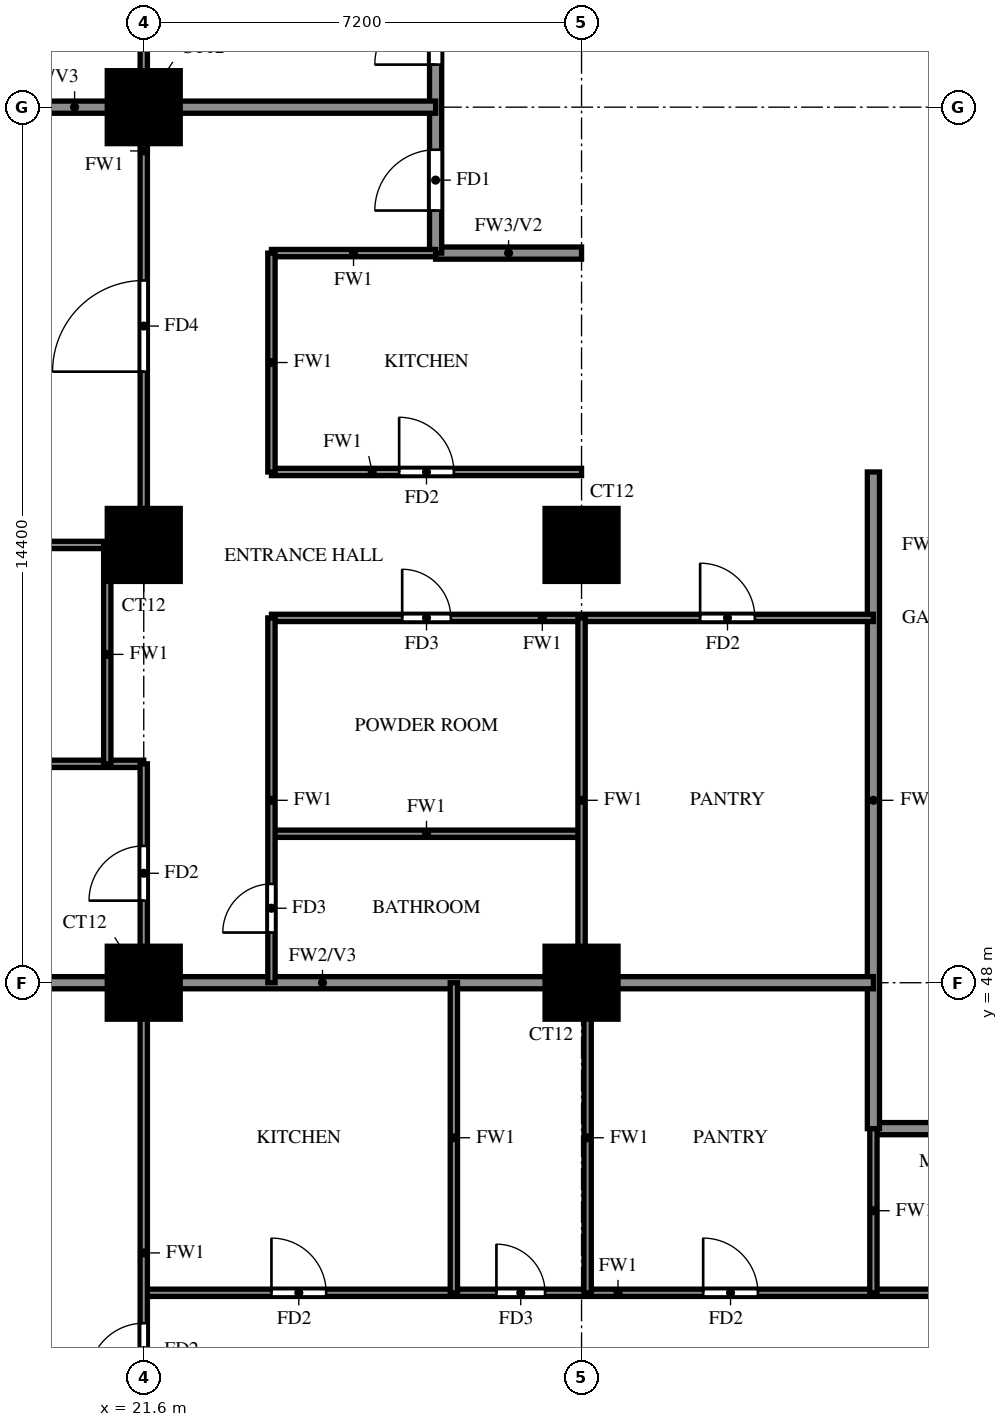
"""IFC4 building model, lengths in metres.
Left out: names, types, materials, properties, quantities, classifications, styles, units other than length and angle.
Written with IfcOpenShell. Run it as: python <this file> out.ifc"""

import sys

from ifc_helpers import new_model, si_unit, direction, frame, frame_2d, origin, origin_2d, place, context, subcontext, project, spatial, rectangle, extrude, source, transform, mapped, element, fill, save


model = new_model("IFC4")
c1 = context("Model", 3, precision=1e-05, world=origin(), true_north=direction((0.0, 1.0)))
c2 = subcontext(c1, "Body", "Model", "MODEL_VIEW")
j1 = project(units=[si_unit("LENGTHUNIT", "METRE"), si_unit("PLANEANGLEUNIT", "RADIAN")], contexts=[c1])
p1 = place(None, origin())
s1 = spatial("IfcSite", under=j1, at=p1, CompositionType="ELEMENT")
p2 = place(p1, origin())
s2 = spatial("IfcBuilding", under=s1, at=p2, CompositionType="ELEMENT")
p3 = place(p2, frame((0.0, 0.0, 100.5)))
s3 = spatial("IfcBuildingStorey", under=s2, at=p3, CompositionType="ELEMENT", Elevation=100.5)
m1 = source(origin(), c2, "Body", "SweptSolid", [
    extrude(rectangle(XDim=1.2, YDim=1.2, at=origin_2d()), origin(), (0.0, 0.0, 1.0), 3.18),
])
for number, where, z_axis, x_axis in (
    (1, (21.6, 48.0, 0.0), (0.0, 0.0, 1.0), (1.0, 0.0, 0.0)),
    (2, (28.8, 48.0, 0.0), (0.0, 0.0, 1.0), (1.0, 0.0, 0.0)),
    (3, (21.6, 55.2, 0.0), (0.0, 0.0, 1.0), (1.0, 0.0, 0.0)),
    (4, (28.8, 55.2, 0.0), (0.0, 0.0, 1.0), (1.0, 0.0, 0.0)),
    (5, (21.6, 62.4, 0.0), (0.0, 0.0, 1.0), (1.0, 0.0, 0.0)),
):
    element("IfcColumn", number, at=place(p3, frame(where, z_axis=z_axis, x_axis=x_axis)), inside=s3, PredefinedType="COLUMN", context=c2, shape_type="MappedRepresentation", body=[
        mapped(m1, transform((0.0, 0.0, 0.0))),
    ])
p4 = place(p3, frame((33.6, 45.6, 0.0), z_axis=(0.0, 0.0, 1.0), x_axis=(1.0, 0.0, 0.0)))
e6 = element("IfcWall", 6, at=p4, inside=s3, PredefinedType="SOLIDWALL", context=c2, shape_type="SweptSolid", body=[
    extrude(rectangle(XDim=6.0, YDim=0.2, at=frame_2d((3.0, 0.0))), origin(), (0.0, 0.0, 1.0), 3.18),
])
p5 = place(p4, frame((4.3, 0.0, 0.0)))
e7 = element("IfcOpeningElement", 7, at=p5, cuts=e6, PredefinedType="OPENING", context=c2, shape_type="SweptSolid", body=[
    extrude(rectangle(XDim=1.0, YDim=2.1, at=frame_2d((0.5, 1.05))), frame((0.0, 0.11, 0.0), z_axis=(0.0, -1.0, 0.0), x_axis=(1.0, 0.0, 0.0)), (0.0, 0.0, 1.0), 0.22),
])
p6 = place(p3, frame((26.4, 60.0, 0.0), z_axis=(0.0, 0.0, 1.0), x_axis=(1.0, 0.0, 0.0)))
e8 = element("IfcWall", 8, at=p6, inside=s3, PredefinedType="SOLIDWALL", context=c2, shape_type="SweptSolid", body=[
    extrude(rectangle(XDim=2.4, YDim=0.2, at=frame_2d((1.2, 0.0))), origin(), (0.0, 0.0, 1.0), 3.18),
])
p7 = place(p3, frame((26.4, 60.0, 0.0), z_axis=(0.0, 0.0, 1.0), x_axis=(0.0, 1.0, 0.0)))
e9 = element("IfcWall", 9, at=p7, inside=s3, PredefinedType="SOLIDWALL", context=c2, shape_type="SweptSolid", body=[
    extrude(rectangle(XDim=9.6, YDim=0.2, at=frame_2d((4.8, 0.0))), origin(), (0.0, 0.0, 1.0), 3.18),
])
p8 = place(p7, frame((0.7, 0.0, 0.0)))
e10 = element("IfcOpeningElement", 10, at=p8, cuts=e9, PredefinedType="OPENING", context=c2, shape_type="SweptSolid", body=[
    extrude(rectangle(XDim=1.0, YDim=2.1, at=frame_2d((0.5, 1.05))), frame((0.0, 0.11, 0.0), z_axis=(0.0, -1.0, 0.0), x_axis=(1.0, 0.0, 0.0)), (0.0, 0.0, 1.0), 0.22),
])
p9 = place(p7, frame((3.1, 0.0, 0.0)))
e11 = element("IfcOpeningElement", 11, at=p9, cuts=e9, PredefinedType="OPENING", context=c2, shape_type="SweptSolid", body=[
    extrude(rectangle(XDim=1.0, YDim=2.1, at=frame_2d((0.5, 1.05))), frame((0.0, 0.11, 0.0), z_axis=(0.0, -1.0, 0.0), x_axis=(1.0, 0.0, 0.0)), (0.0, 0.0, 1.0), 0.22),
])
p10 = place(p3, frame((33.6, 45.6, 0.0), z_axis=(0.0, 0.0, 1.0), x_axis=(0.0, 1.0, 0.0)))
e12 = element("IfcWall", 12, at=p10, inside=s3, PredefinedType="SOLIDWALL", context=c2, shape_type="SweptSolid", body=[
    extrude(rectangle(XDim=10.8, YDim=0.2, at=frame_2d((5.4, 0.0))), origin(), (0.0, 0.0, 1.0), 3.18),
])
p11 = place(p3, frame((14.525, 48.0, 0.0), z_axis=(0.0, 0.0, 1.0), x_axis=(1.0, 0.0, 0.0)))
e13 = element("IfcWall", 13, at=p11, inside=s3, PredefinedType="SOLIDWALL", context=c2, shape_type="SweptSolid", body=[
    extrude(rectangle(XDim=19.075, YDim=0.2, at=frame_2d((9.538, 0.0))), origin(), (0.0, 0.0, 1.0), 3.18),
])
p12 = place(p3, frame((14.525, 62.4, 0.0), z_axis=(0.0, 0.0, 1.0), x_axis=(1.0, 0.0, 0.0)))
e14 = element("IfcWall", 14, at=p12, inside=s3, PredefinedType="SOLIDWALL", context=c2, shape_type="SweptSolid", body=[
    extrude(rectangle(XDim=11.875, YDim=0.2, at=frame_2d((5.938, 0.0))), origin(), (0.0, 0.0, 1.0), 3.18),
])
p13 = place(p3, frame((21.6, 42.9, 0.0), z_axis=(0.0, 0.0, 1.0), x_axis=(1.0, 0.0, 0.0)))
e15 = element("IfcWall", 15, at=p13, inside=s3, PredefinedType="PARTITIONING", context=c2, shape_type="SweptSolid", body=[
    extrude(rectangle(XDim=15.6, YDim=0.12, at=frame_2d((7.8, 0.0))), origin(), (0.0, 0.0, 1.0), 3.18),
])
p14 = place(p13, frame((2.1, 0.0, 0.0)))
e16 = element("IfcOpeningElement", 16, at=p14, cuts=e15, PredefinedType="OPENING", context=c2, shape_type="SweptSolid", body=[
    extrude(rectangle(XDim=0.9, YDim=2.1, at=frame_2d((0.45, 1.05))), frame((0.0, 0.07, 0.0), z_axis=(0.0, -1.0, 0.0), x_axis=(1.0, 0.0, 0.0)), (0.0, 0.0, 1.0), 0.14),
])
p15 = place(p13, frame((5.8, 0.0, 0.0)))
e17 = element("IfcOpeningElement", 17, at=p15, cuts=e15, PredefinedType="OPENING", context=c2, shape_type="SweptSolid", body=[
    extrude(rectangle(XDim=0.8, YDim=2.1, at=frame_2d((0.4, 1.05))), frame((0.0, 0.07, 0.0), z_axis=(0.0, -1.0, 0.0), x_axis=(1.0, 0.0, 0.0)), (0.0, 0.0, 1.0), 0.14),
])
p16 = place(p13, frame((9.2, 0.0, 0.0)))
e18 = element("IfcOpeningElement", 18, at=p16, cuts=e15, PredefinedType="OPENING", context=c2, shape_type="SweptSolid", body=[
    extrude(rectangle(XDim=0.9, YDim=2.1, at=frame_2d((0.45, 1.05))), frame((0.0, 0.07, 0.0), z_axis=(0.0, -1.0, 0.0), x_axis=(1.0, 0.0, 0.0)), (0.0, 0.0, 1.0), 0.14),
])
p17 = place(p13, frame((13.35, 0.0, 0.0)))
e19 = element("IfcOpeningElement", 19, at=p17, cuts=e15, PredefinedType="OPENING", context=c2, shape_type="SweptSolid", body=[
    extrude(rectangle(XDim=0.9, YDim=2.1, at=frame_2d((0.45, 1.05))), frame((0.0, 0.07, 0.0), z_axis=(0.0, -1.0, 0.0), x_axis=(1.0, 0.0, 0.0)), (0.0, 0.0, 1.0), 0.14),
])
p18 = place(p3, frame((23.7, 50.45, 0.0), z_axis=(0.0, 0.0, 1.0), x_axis=(1.0, 0.0, 0.0)))
e20 = element("IfcWall", 20, at=p18, inside=s3, PredefinedType="PARTITIONING", context=c2, shape_type="SweptSolid", body=[
    extrude(rectangle(XDim=5.1, YDim=0.12, at=frame_2d((2.55, 0.0))), origin(), (0.0, 0.0, 1.0), 3.18),
])
p19 = place(p3, frame((14.525, 51.6, 0.0), z_axis=(0.0, 0.0, 1.0), x_axis=(1.0, 0.0, 0.0)))
e21 = element("IfcWall", 21, at=p19, inside=s3, PredefinedType="PARTITIONING", context=c2, shape_type="SweptSolid", body=[
    extrude(rectangle(XDim=7.075, YDim=0.12, at=frame_2d((3.538, 0.0))), origin(), (0.0, 0.0, 1.0), 2.28),
])
p20 = place(p19, frame((2.837, 0.0, 0.0)))
e22 = element("IfcOpeningElement", 22, at=p20, cuts=e21, PredefinedType="OPENING", context=c2, shape_type="SweptSolid", body=[
    extrude(rectangle(XDim=0.8, YDim=2.1, at=frame_2d((0.4, 1.05))), frame((0.0, 0.07, 0.0), z_axis=(0.0, -1.0, 0.0), x_axis=(1.0, 0.0, 0.0)), (0.0, 0.0, 1.0), 0.14),
])
p21 = place(p3, frame((23.7, 54.0, 0.0), z_axis=(0.0, 0.0, 1.0), x_axis=(1.0, 0.0, 0.0)))
e23 = element("IfcWall", 23, at=p21, inside=s3, PredefinedType="PARTITIONING", context=c2, shape_type="SweptSolid", body=[
    extrude(rectangle(XDim=9.9, YDim=0.12, at=frame_2d((4.95, 0.0))), origin(), (0.0, 0.0, 1.0), 3.18),
])
p22 = place(p21, frame((2.15, 0.0, 0.0)))
e24 = element("IfcOpeningElement", 24, at=p22, cuts=e23, PredefinedType="OPENING", context=c2, shape_type="SweptSolid", body=[
    extrude(rectangle(XDim=0.8, YDim=2.1, at=frame_2d((0.4, 1.05))), frame((0.0, 0.07, 0.0), z_axis=(0.0, -1.0, 0.0), x_axis=(1.0, 0.0, 0.0)), (0.0, 0.0, 1.0), 0.14),
])
p23 = place(p21, frame((7.05, 0.0, 0.0)))
e25 = element("IfcOpeningElement", 25, at=p23, cuts=e23, PredefinedType="OPENING", context=c2, shape_type="SweptSolid", body=[
    extrude(rectangle(XDim=0.9, YDim=2.1, at=frame_2d((0.45, 1.05))), frame((0.0, 0.07, 0.0), z_axis=(0.0, -1.0, 0.0), x_axis=(1.0, 0.0, 0.0)), (0.0, 0.0, 1.0), 0.14),
])
p24 = place(p3, frame((14.525, 55.2, 0.0), z_axis=(0.0, 0.0, 1.0), x_axis=(1.0, 0.0, 0.0)))
e26 = element("IfcWall", 26, at=p24, inside=s3, PredefinedType="PARTITIONING", context=c2, shape_type="SweptSolid", body=[
    extrude(rectangle(XDim=7.075, YDim=0.12, at=frame_2d((3.538, 0.0))), origin(), (0.0, 0.0, 1.0), 3.18),
])
p25 = place(p3, frame((23.7, 56.4, 0.0), z_axis=(0.0, 0.0, 1.0), x_axis=(1.0, 0.0, 0.0)))
e27 = element("IfcWall", 27, at=p25, inside=s3, PredefinedType="PARTITIONING", context=c2, shape_type="SweptSolid", body=[
    extrude(rectangle(XDim=5.1, YDim=0.12, at=frame_2d((2.55, 0.0))), origin(), (0.0, 0.0, 1.0), 3.18),
])
p26 = place(p25, frame((2.1, 0.0, 0.0)))
e28 = element("IfcOpeningElement", 28, at=p26, cuts=e27, PredefinedType="OPENING", context=c2, shape_type="SweptSolid", body=[
    extrude(rectangle(XDim=0.9, YDim=2.1, at=frame_2d((0.45, 1.05))), frame((0.0, 0.07, 0.0), z_axis=(0.0, -1.0, 0.0), x_axis=(1.0, 0.0, 0.0)), (0.0, 0.0, 1.0), 0.14),
])
p27 = place(p3, frame((23.7, 60.0, 0.0), z_axis=(0.0, 0.0, 1.0), x_axis=(1.0, 0.0, 0.0)))
e29 = element("IfcWall", 29, at=p27, inside=s3, PredefinedType="PARTITIONING", context=c2, shape_type="SweptSolid", body=[
    extrude(rectangle(XDim=2.7, YDim=0.12, at=frame_2d((1.35, 0.0))), origin(), (0.0, 0.0, 1.0), 3.18),
])
p28 = place(p3, frame((21.0, 51.6, 0.0), z_axis=(0.0, 0.0, 1.0), x_axis=(0.0, 1.0, 0.0)))
e30 = element("IfcWall", 30, at=p28, inside=s3, PredefinedType="PARTITIONING", context=c2, shape_type="SweptSolid", body=[
    extrude(rectangle(XDim=3.6, YDim=0.12, at=frame_2d((1.8, 0.0))), origin(), (0.0, 0.0, 1.0), 3.18),
])
p29 = place(p3, frame((21.6, 33.725, 0.0), z_axis=(0.0, 0.0, 1.0), x_axis=(0.0, 1.0, 0.0)))
e31 = element("IfcWall", 31, at=p29, inside=s3, PredefinedType="PARTITIONING", context=c2, shape_type="SweptSolid", body=[
    extrude(rectangle(XDim=17.875, YDim=0.12, at=frame_2d((8.938, 0.0))), origin(), (0.0, 0.0, 1.0), 3.18),
])
p30 = place(p29, frame((7.775, 0.0, 0.0)))
e32 = element("IfcOpeningElement", 32, at=p30, cuts=e31, PredefinedType="OPENING", context=c2, shape_type="SweptSolid", body=[
    extrude(rectangle(XDim=0.9, YDim=2.1, at=frame_2d((0.45, 1.05))), frame((0.0, 0.07, 0.0), z_axis=(0.0, -1.0, 0.0), x_axis=(1.0, 0.0, 0.0)), (0.0, 0.0, 1.0), 0.14),
])
p31 = place(p29, frame((15.625, 0.0, 0.0)))
e33 = element("IfcOpeningElement", 33, at=p31, cuts=e31, PredefinedType="OPENING", context=c2, shape_type="SweptSolid", body=[
    extrude(rectangle(XDim=0.9, YDim=2.1, at=frame_2d((0.45, 1.05))), frame((0.0, 0.07, 0.0), z_axis=(0.0, -1.0, 0.0), x_axis=(1.0, 0.0, 0.0)), (0.0, 0.0, 1.0), 0.14),
])
p32 = place(p3, frame((21.6, 55.2, 0.0), z_axis=(0.0, 0.0, 1.0), x_axis=(0.0, 1.0, 0.0)))
e34 = element("IfcWall", 34, at=p32, inside=s3, PredefinedType="PARTITIONING", context=c2, shape_type="SweptSolid", body=[
    extrude(rectangle(XDim=14.4, YDim=0.12, at=frame_2d((7.2, 0.0))), origin(), (0.0, 0.0, 1.0), 3.18),
])
p33 = place(p32, frame((2.85, 0.0, 0.0)))
e35 = element("IfcOpeningElement", 35, at=p33, cuts=e34, PredefinedType="OPENING", context=c2, shape_type="SweptSolid", body=[
    extrude(rectangle(XDim=1.5, YDim=2.1, at=frame_2d((0.75, 1.05))), frame((0.0, 0.07, 0.0), z_axis=(0.0, -1.0, 0.0), x_axis=(1.0, 0.0, 0.0)), (0.0, 0.0, 1.0), 0.14),
])
p34 = place(p32, frame((8.55, 0.0, 0.0)))
e36 = element("IfcOpeningElement", 36, at=p34, cuts=e34, PredefinedType="OPENING", context=c2, shape_type="SweptSolid", body=[
    extrude(rectangle(XDim=0.9, YDim=2.1, at=frame_2d((0.45, 1.05))), frame((0.0, 0.07, 0.0), z_axis=(0.0, -1.0, 0.0), x_axis=(1.0, 0.0, 0.0)), (0.0, 0.0, 1.0), 0.14),
])
p35 = place(p32, frame((12.15, 0.0, 0.0)))
e37 = element("IfcOpeningElement", 37, at=p35, cuts=e34, PredefinedType="OPENING", context=c2, shape_type="SweptSolid", body=[
    extrude(rectangle(XDim=0.9, YDim=2.1, at=frame_2d((0.45, 1.05))), frame((0.0, 0.07, 0.0), z_axis=(0.0, -1.0, 0.0), x_axis=(1.0, 0.0, 0.0)), (0.0, 0.0, 1.0), 0.14),
])
p36 = place(p3, frame((23.7, 48.0, 0.0), z_axis=(0.0, 0.0, 1.0), x_axis=(0.0, 1.0, 0.0)))
e38 = element("IfcWall", 38, at=p36, inside=s3, PredefinedType="PARTITIONING", context=c2, shape_type="SweptSolid", body=[
    extrude(rectangle(XDim=6.0, YDim=0.12, at=frame_2d((3.0, 0.0))), origin(), (0.0, 0.0, 1.0), 3.18),
])
p37 = place(p36, frame((0.825, 0.0, 0.0)))
e39 = element("IfcOpeningElement", 39, at=p37, cuts=e38, PredefinedType="OPENING", context=c2, shape_type="SweptSolid", body=[
    extrude(rectangle(XDim=0.8, YDim=2.1, at=frame_2d((0.4, 1.05))), frame((0.0, 0.07, 0.0), z_axis=(0.0, -1.0, 0.0), x_axis=(1.0, 0.0, 0.0)), (0.0, 0.0, 1.0), 0.14),
])
p38 = place(p3, frame((23.7, 56.4, 0.0), z_axis=(0.0, 0.0, 1.0), x_axis=(0.0, 1.0, 0.0)))
e40 = element("IfcWall", 40, at=p38, inside=s3, PredefinedType="PARTITIONING", context=c2, shape_type="SweptSolid", body=[
    extrude(rectangle(XDim=3.6, YDim=0.12, at=frame_2d((1.8, 0.0))), origin(), (0.0, 0.0, 1.0), 3.18),
])
p39 = place(p3, frame((26.7, 42.9, 0.0), z_axis=(0.0, 0.0, 1.0), x_axis=(0.0, 1.0, 0.0)))
e41 = element("IfcWall", 41, at=p39, inside=s3, PredefinedType="PARTITIONING", context=c2, shape_type="SweptSolid", body=[
    extrude(rectangle(XDim=5.1, YDim=0.12, at=frame_2d((2.55, 0.0))), origin(), (0.0, 0.0, 1.0), 3.18),
])
p40 = place(p3, frame((28.8, 48.0, 0.0), z_axis=(0.0, 0.0, 1.0), x_axis=(0.0, 1.0, 0.0)))
e42 = element("IfcWall", 42, at=p40, inside=s3, PredefinedType="PARTITIONING", context=c2, shape_type="SweptSolid", body=[
    extrude(rectangle(XDim=6.0, YDim=0.12, at=frame_2d((3.0, 0.0))), origin(), (0.0, 0.0, 1.0), 3.18),
])
p41 = place(p3, frame((28.9, 42.9, 0.0), z_axis=(0.0, 0.0, 1.0), x_axis=(0.0, 1.0, 0.0)))
e43 = element("IfcWall", 43, at=p41, inside=s3, PredefinedType="PARTITIONING", context=c2, shape_type="SweptSolid", body=[
    extrude(rectangle(XDim=5.1, YDim=0.12, at=frame_2d((2.55, 0.0))), origin(), (0.0, 0.0, 1.0), 3.18),
])
p42 = place(p3, frame((33.6, 42.9, 0.0), z_axis=(0.0, 0.0, 1.0), x_axis=(0.0, 1.0, 0.0)))
e44 = element("IfcWall", 44, at=p42, inside=s3, PredefinedType="PARTITIONING", context=c2, shape_type="SweptSolid", body=[
    extrude(rectangle(XDim=2.7, YDim=0.12, at=frame_2d((1.35, 0.0))), origin(), (0.0, 0.0, 1.0), 3.18),
])
p43 = place(p30, origin())
e45 = element("IfcDoor", 45, at=p43, inside=s3, OperationType="SINGLE_SWING_LEFT", PredefinedType="DOOR", context=c2, shape_type="SweptSolid", body=[
    extrude(rectangle(XDim=0.9, YDim=2.1, at=frame_2d((0.45, 1.05))), frame((0.0, 0.025, 0.0), z_axis=(0.0, -1.0, 0.0), x_axis=(1.0, 0.0, 0.0)), (0.0, 0.0, 1.0), 0.05),
])
fill(e32, e45)
p44 = place(p14, origin())
e46 = element("IfcDoor", 46, at=p44, inside=s3, OperationType="SINGLE_SWING_RIGHT", PredefinedType="DOOR", context=c2, shape_type="SweptSolid", body=[
    extrude(rectangle(XDim=0.9, YDim=2.1, at=frame_2d((0.45, 1.05))), frame((0.0, 0.025, 0.0), z_axis=(0.0, -1.0, 0.0), x_axis=(1.0, 0.0, 0.0)), (0.0, 0.0, 1.0), 0.05),
])
fill(e16, e46)
p45 = place(p15, origin())
e47 = element("IfcDoor", 47, at=p45, inside=s3, OperationType="SINGLE_SWING_LEFT", PredefinedType="DOOR", context=c2, shape_type="SweptSolid", body=[
    extrude(rectangle(XDim=0.8, YDim=2.1, at=frame_2d((0.4, 1.05))), frame((0.0, 0.025, 0.0), z_axis=(0.0, -1.0, 0.0), x_axis=(1.0, 0.0, 0.0)), (0.0, 0.0, 1.0), 0.05),
])
fill(e17, e47)
p46 = place(p16, origin())
e48 = element("IfcDoor", 48, at=p46, inside=s3, OperationType="SINGLE_SWING_LEFT", PredefinedType="DOOR", context=c2, shape_type="SweptSolid", body=[
    extrude(rectangle(XDim=0.9, YDim=2.1, at=frame_2d((0.45, 1.05))), frame((0.0, 0.025, 0.0), z_axis=(0.0, -1.0, 0.0), x_axis=(1.0, 0.0, 0.0)), (0.0, 0.0, 1.0), 0.05),
])
fill(e18, e48)
p47 = place(p8, origin())
e49 = element("IfcDoor", 49, at=p47, inside=s3, OperationType="SINGLE_SWING_LEFT", PredefinedType="DOOR", context=c2, shape_type="SweptSolid", body=[
    extrude(rectangle(XDim=1.0, YDim=2.1, at=frame_2d((0.5, 1.05))), frame((0.0, 0.025, 0.0), z_axis=(0.0, -1.0, 0.0), x_axis=(1.0, 0.0, 0.0)), (0.0, 0.0, 1.0), 0.05),
])
fill(e10, e49)
p48 = place(p31, origin())
e50 = element("IfcDoor", 50, at=p48, inside=s3, OperationType="SINGLE_SWING_LEFT", PredefinedType="DOOR", context=c2, shape_type="SweptSolid", body=[
    extrude(rectangle(XDim=0.9, YDim=2.1, at=frame_2d((0.45, 1.05))), frame((0.0, 0.025, 0.0), z_axis=(0.0, -1.0, 0.0), x_axis=(1.0, 0.0, 0.0)), (0.0, 0.0, 1.0), 0.05),
])
fill(e33, e50)
p49 = place(p33, origin())
e51 = element("IfcDoor", 51, at=p49, inside=s3, OperationType="SINGLE_SWING_LEFT", PredefinedType="DOOR", context=c2, shape_type="SweptSolid", body=[
    extrude(rectangle(XDim=1.5, YDim=2.1, at=frame_2d((0.75, 1.05))), frame((0.0, 0.025, 0.0), z_axis=(0.0, -1.0, 0.0), x_axis=(1.0, 0.0, 0.0)), (0.0, 0.0, 1.0), 0.05),
])
fill(e35, e51)
p50 = place(p37, origin())
e52 = element("IfcDoor", 52, at=p50, inside=s3, OperationType="SINGLE_SWING_LEFT", PredefinedType="DOOR", context=c2, shape_type="SweptSolid", body=[
    extrude(rectangle(XDim=0.8, YDim=2.1, at=frame_2d((0.4, 1.05))), frame((0.0, 0.025, 0.0), z_axis=(0.0, -1.0, 0.0), x_axis=(1.0, 0.0, 0.0)), (0.0, 0.0, 1.0), 0.05),
])
fill(e39, e52)
p51 = place(p22, origin())
e53 = element("IfcDoor", 53, at=p51, inside=s3, OperationType="SINGLE_SWING_RIGHT", PredefinedType="DOOR", context=c2, shape_type="SweptSolid", body=[
    extrude(rectangle(XDim=0.8, YDim=2.1, at=frame_2d((0.4, 1.05))), frame((0.0, 0.025, 0.0), z_axis=(0.0, -1.0, 0.0), x_axis=(1.0, 0.0, 0.0)), (0.0, 0.0, 1.0), 0.05),
])
fill(e24, e53)
p52 = place(p26, origin())
e54 = element("IfcDoor", 54, at=p52, inside=s3, OperationType="SINGLE_SWING_LEFT", PredefinedType="DOOR", context=c2, shape_type="SweptSolid", body=[
    extrude(rectangle(XDim=0.9, YDim=2.1, at=frame_2d((0.45, 1.05))), frame((0.0, 0.025, 0.0), z_axis=(0.0, -1.0, 0.0), x_axis=(1.0, 0.0, 0.0)), (0.0, 0.0, 1.0), 0.05),
])
fill(e28, e54)
p53 = place(p23, origin())
e55 = element("IfcDoor", 55, at=p53, inside=s3, OperationType="SINGLE_SWING_LEFT", PredefinedType="DOOR", context=c2, shape_type="SweptSolid", body=[
    extrude(rectangle(XDim=0.9, YDim=2.1, at=frame_2d((0.45, 1.05))), frame((0.0, 0.025, 0.0), z_axis=(0.0, -1.0, 0.0), x_axis=(1.0, 0.0, 0.0)), (0.0, 0.0, 1.0), 0.05),
])
fill(e25, e55)
p54 = place(p9, origin())
e56 = element("IfcDoor", 56, at=p54, inside=s3, OperationType="SINGLE_SWING_LEFT", PredefinedType="DOOR", context=c2, shape_type="SweptSolid", body=[
    extrude(rectangle(XDim=1.0, YDim=2.1, at=frame_2d((0.5, 1.05))), frame((0.0, 0.025, 0.0), z_axis=(0.0, -1.0, 0.0), x_axis=(1.0, 0.0, 0.0)), (0.0, 0.0, 1.0), 0.05),
])
fill(e11, e56)
save(model, sys.argv[1])
